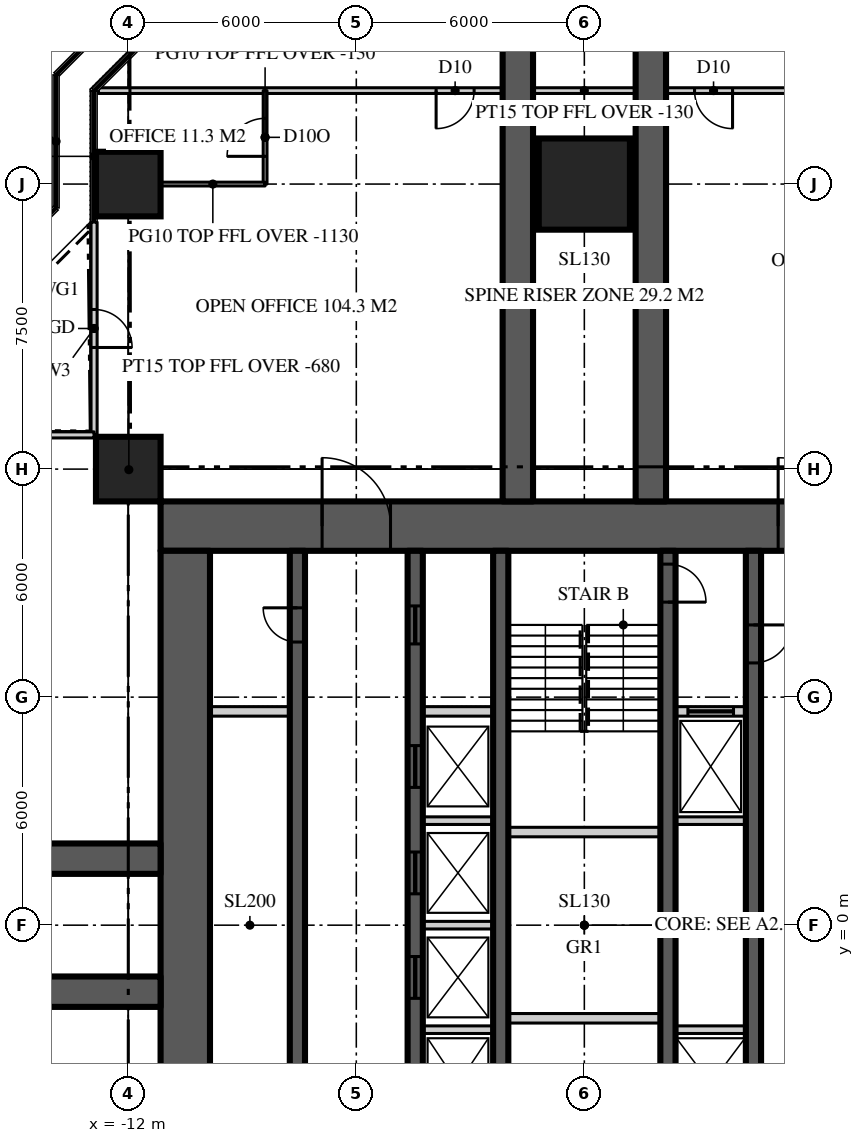
"""IFC4 building model, lengths in metres.
Left out: names, types, materials, properties, quantities, classifications, styles, units other than length and angle.
Written with IfcOpenShell. Run it as: python <this file> out.ifc"""

import sys

from ifc_helpers import new_model, si_unit, direction, frame, frame_2d, origin, origin_2d, place, context, subcontext, project, spatial, rectangle, extrude, element, fill, save


model = new_model("IFC4")
c1 = context("Model", 3, precision=1e-05, world=origin(), true_north=direction((0.0, 1.0)))
c2 = subcontext(c1, "Body", "Model", "MODEL_VIEW")
j1 = project(units=[si_unit("LENGTHUNIT", "METRE"), si_unit("PLANEANGLEUNIT", "RADIAN")], contexts=[c1])
p1 = place(None, origin())
s1 = spatial("IfcSite", under=j1, at=p1, CompositionType="ELEMENT")
p2 = place(p1, origin())
s2 = spatial("IfcBuilding", under=s1, at=p2, CompositionType="ELEMENT")
p3 = place(p2, frame((0.0, 0.0, 186.6)))
s3 = spatial("IfcBuildingStorey", under=s2, at=p3, CompositionType="ELEMENT", Elevation=186.6)
p4 = place(p3, frame((-11.15, 10.5, 0.0), z_axis=(0.0, 0.0, 1.0), x_axis=(1.0, 0.0, 0.0)))
e1 = element("IfcWall", 1, at=p4, inside=s3, PredefinedType="SHEAR", context=c2, shape_type="SweptSolid", body=[
    extrude(rectangle(XDim=22.3, YDim=1.3, at=frame_2d((11.15, 0.0))), origin(), (0.0, 0.0, 1.0), 3.9),
])
p5 = place(p4, frame((4.25, 0.0, 0.0)))
e2 = element("IfcOpeningElement", 2, at=p5, cuts=e1, PredefinedType="OPENING", context=c2, shape_type="SweptSolid", body=[
    extrude(rectangle(XDim=1.8, YDim=2.2, at=frame_2d((0.9, 1.1))), frame((0.0, 0.66, 0.0), z_axis=(0.0, -1.0, 0.0), x_axis=(1.0, 0.0, 0.0)), (0.0, 0.0, 1.0), 1.32),
])
p6 = place(p4, frame((16.25, 0.0, 0.0)))
e3 = element("IfcOpeningElement", 3, at=p6, cuts=e1, PredefinedType="OPENING", context=c2, shape_type="SweptSolid", body=[
    extrude(rectangle(XDim=1.8, YDim=2.2, at=frame_2d((0.9, 1.1))), frame((0.0, 0.66, 0.0), z_axis=(0.0, -1.0, 0.0), x_axis=(1.0, 0.0, 0.0)), (0.0, 0.0, 1.0), 1.32),
])
p7 = place(p3, frame((-10.5, 9.85, 0.0), z_axis=(0.0, 0.0, 1.0), x_axis=(0.0, -1.0, 0.0)))
e4 = element("IfcWall", 4, at=p7, inside=s3, PredefinedType="SHEAR", context=c2, shape_type="SweptSolid", body=[
    extrude(rectangle(XDim=19.7, YDim=1.3, at=frame_2d((9.85, 0.0))), origin(), (0.0, 0.0, 1.0), 3.9),
])
p8 = place(p7, frame((17.25, 0.0, 0.0)))
e5 = element("IfcOpeningElement", 5, at=p8, cuts=e4, PredefinedType="OPENING", context=c2, shape_type="SweptSolid", body=[
    extrude(rectangle(XDim=1.0, YDim=2.2, at=frame_2d((0.5, 1.1))), frame((0.0, 0.66, 0.0), z_axis=(0.0, -1.0, 0.0), x_axis=(1.0, 0.0, 0.0)), (0.0, 0.0, 1.0), 1.32),
])
for number, where, z_axis, x_axis in (
    (6, (1.75, 11.15, 0.0), (0.0, 0.0, 1.0), (0.0, 1.0, 0.0)),
    (7, (-1.75, 11.15, 0.0), (0.0, 0.0, 1.0), (0.0, 1.0, 0.0)),
    (8, (-11.15, 1.75, 0.0), (0.0, 0.0, 1.0), (-1.0, 0.0, 0.0)),
    (9, (-11.15, -1.75, 0.0), (0.0, 0.0, 1.0), (-1.0, 0.0, 0.0)),
):
    element("IfcWall", number, at=place(p3, frame(where, z_axis=z_axis, x_axis=x_axis)), inside=s3, PredefinedType="SHEAR", context=c2, shape_type="SweptSolid", body=[
        extrude(rectangle(XDim=15.25, YDim=0.8, at=frame_2d((7.625, 0.0))), origin(), (0.0, 0.0, 1.0), 3.9),
    ])
for number, where, z_axis, x_axis in (
    (10, (-12.0, 12.0, 0.0), (0.0, 0.0, 1.0), (1.0, 0.0, 0.0)),
    (11, (-12.0, 19.5, 0.0), (0.0, 0.0, 1.0), (1.0, 0.0, 0.0)),
):
    element("IfcColumn", number, at=place(p3, frame(where, z_axis=z_axis, x_axis=x_axis)), inside=s3, PredefinedType="COLUMN", context=c2, shape_type="SweptSolid", body=[
        extrude(rectangle(XDim=1.7, YDim=1.7, at=origin_2d()), origin(), (0.0, 0.0, 1.0), 3.9),
    ])
p9 = place(p3, frame((0.0, 19.5, 0.0), z_axis=(0.0, 0.0, 1.0), x_axis=(1.0, 0.0, 0.0)))
e12 = element("IfcColumn", 12, at=p9, inside=s3, PredefinedType="COLUMN", context=c2, shape_type="SweptSolid", body=[
    extrude(rectangle(XDim=2.4, YDim=2.4, at=origin_2d()), origin(), (0.0, 0.0, 1.0), 3.9),
])
p10 = place(p3, frame((-12.9, 18.5, 0.0), z_axis=(0.0, 0.0, 1.0), x_axis=(0.0, -1.0, 0.0)))
e13 = element("IfcWall", 13, at=p10, inside=s3, PredefinedType="SOLIDWALL", context=c2, shape_type="SweptSolid", body=[
    extrude(rectangle(XDim=5.6, YDim=0.16, at=frame_2d((2.8, 0.0))), origin(), (0.0, 0.0, 1.0), 3.77),
])
p11 = place(p10, frame((2.3, 0.0, 0.0)))
e14 = element("IfcOpeningElement", 14, at=p11, cuts=e13, PredefinedType="OPENING", context=c2, shape_type="SweptSolid", body=[
    extrude(rectangle(XDim=1.0, YDim=2.2, at=frame_2d((0.5, 1.1))), frame((0.0, 0.09, 0.0), z_axis=(0.0, -1.0, 0.0), x_axis=(1.0, 0.0, 0.0)), (0.0, 0.0, 1.0), 0.18),
])
p12 = place(p3, frame((-12.9, 12.9, 0.0), z_axis=(0.0, 0.0, 1.0), x_axis=(-1.0, 0.0, 0.0)))
e15 = element("IfcWall", 15, at=p12, inside=s3, PredefinedType="SOLIDWALL", context=c2, shape_type="SweptSolid", body=[
    extrude(rectangle(XDim=5.6, YDim=0.16, at=frame_2d((2.8, 0.0))), origin(), (0.0, 0.0, 1.0), 3.77),
])
p13 = place(p3, frame((-7.55, -9.85, 0.0), z_axis=(0.0, 0.0, 1.0), x_axis=(0.0, 1.0, 0.0)))
e16 = element("IfcWall", 16, at=p13, inside=s3, PredefinedType="SHEAR", context=c2, shape_type="SweptSolid", body=[
    extrude(rectangle(XDim=19.7, YDim=0.4, at=frame_2d((9.85, 0.0))), origin(), (0.0, 0.0, 1.0), 3.9),
])
p14 = place(p13, frame((1.45, 0.0, 0.0)))
e17 = element("IfcOpeningElement", 17, at=p14, cuts=e16, PredefinedType="OPENING", context=c2, shape_type="SweptSolid", body=[
    extrude(rectangle(XDim=1.0, YDim=2.2, at=frame_2d((0.5, 1.1))), frame((0.0, 0.21, 0.0), z_axis=(0.0, -1.0, 0.0), x_axis=(1.0, 0.0, 0.0)), (0.0, 0.0, 1.0), 0.42),
])
p15 = place(p13, frame((17.3, 0.0, 0.0)))
e18 = element("IfcOpeningElement", 18, at=p15, cuts=e16, PredefinedType="OPENING", context=c2, shape_type="SweptSolid", body=[
    extrude(rectangle(XDim=0.9, YDim=2.1, at=frame_2d((0.45, 1.05))), frame((0.0, 0.21, 0.0), z_axis=(0.0, -1.0, 0.0), x_axis=(1.0, 0.0, 0.0)), (0.0, 0.0, 1.0), 0.42),
])
p16 = place(p3, frame((-4.45, -9.85, 0.0), z_axis=(0.0, 0.0, 1.0), x_axis=(0.0, 1.0, 0.0)))
e19 = element("IfcWall", 19, at=p16, inside=s3, PredefinedType="SHEAR", context=c2, shape_type="SweptSolid", body=[
    extrude(rectangle(XDim=19.7, YDim=0.4, at=frame_2d((9.85, 0.0))), origin(), (0.0, 0.0, 1.0), 3.9),
])
p17 = place(p16, frame((1.95, 0.0, 0.0)))
e20 = element("IfcOpeningElement", 20, at=p17, cuts=e19, PredefinedType="OPENING", context=c2, shape_type="SweptSolid", body=[
    extrude(rectangle(XDim=1.0, YDim=2.2, at=frame_2d((0.5, 1.1))), frame((0.0, 0.21, 0.0), z_axis=(0.0, -1.0, 0.0), x_axis=(1.0, 0.0, 0.0)), (0.0, 0.0, 1.0), 0.42),
])
p18 = place(p16, frame((17.25, 0.0, 0.0)))
e21 = element("IfcOpeningElement", 21, at=p18, cuts=e19, PredefinedType="OPENING", context=c2, shape_type="SweptSolid", body=[
    extrude(rectangle(XDim=1.0, YDim=2.1, at=frame_2d((0.5, 1.05))), frame((0.0, 0.21, 0.0), z_axis=(0.0, -1.0, 0.0), x_axis=(1.0, 0.0, 0.0)), (0.0, 0.0, 1.0), 0.42),
])
p19 = place(p16, frame((7.925, 0.0, 0.0)))
e22 = element("IfcOpeningElement", 22, at=p19, cuts=e19, PredefinedType="OPENING", context=c2, shape_type="SweptSolid", body=[
    extrude(rectangle(XDim=1.1, YDim=2.2, at=frame_2d((0.55, 1.1))), frame((0.0, 0.21, 0.0), z_axis=(0.0, -1.0, 0.0), x_axis=(1.0, 0.0, 0.0)), (0.0, 0.0, 1.0), 0.42),
])
p20 = place(p16, frame((10.675, 0.0, 0.0)))
e23 = element("IfcOpeningElement", 23, at=p20, cuts=e19, PredefinedType="OPENING", context=c2, shape_type="SweptSolid", body=[
    extrude(rectangle(XDim=1.1, YDim=2.2, at=frame_2d((0.55, 1.1))), frame((0.0, 0.21, 0.0), z_axis=(0.0, -1.0, 0.0), x_axis=(1.0, 0.0, 0.0)), (0.0, 0.0, 1.0), 0.42),
])
p21 = place(p16, frame((13.475, 0.0, 0.0)))
e24 = element("IfcOpeningElement", 24, at=p21, cuts=e19, PredefinedType="OPENING", context=c2, shape_type="SweptSolid", body=[
    extrude(rectangle(XDim=1.1, YDim=2.2, at=frame_2d((0.55, 1.1))), frame((0.0, 0.21, 0.0), z_axis=(0.0, -1.0, 0.0), x_axis=(1.0, 0.0, 0.0)), (0.0, 0.0, 1.0), 0.42),
])
p22 = place(p3, frame((4.45, 9.85, 0.0), z_axis=(0.0, 0.0, 1.0), x_axis=(0.0, -1.0, 0.0)))
e25 = element("IfcWall", 25, at=p22, inside=s3, PredefinedType="SHEAR", context=c2, shape_type="SweptSolid", body=[
    extrude(rectangle(XDim=19.7, YDim=0.4, at=frame_2d((9.85, 0.0))), origin(), (0.0, 0.0, 1.0), 3.9),
])
p23 = place(p22, frame((1.95, 0.0, 0.0)))
e26 = element("IfcOpeningElement", 26, at=p23, cuts=e25, PredefinedType="OPENING", context=c2, shape_type="SweptSolid", body=[
    extrude(rectangle(XDim=1.0, YDim=2.2, at=frame_2d((0.5, 1.1))), frame((0.0, 0.21, 0.0), z_axis=(0.0, -1.0, 0.0), x_axis=(1.0, 0.0, 0.0)), (0.0, 0.0, 1.0), 0.42),
])
p24 = place(p22, frame((17.3, 0.0, 0.0)))
e27 = element("IfcOpeningElement", 27, at=p24, cuts=e25, PredefinedType="OPENING", context=c2, shape_type="SweptSolid", body=[
    extrude(rectangle(XDim=0.9, YDim=2.1, at=frame_2d((0.45, 1.05))), frame((0.0, 0.21, 0.0), z_axis=(0.0, -1.0, 0.0), x_axis=(1.0, 0.0, 0.0)), (0.0, 0.0, 1.0), 0.42),
])
p25 = place(p3, frame((-2.2, -9.85, 0.0), z_axis=(0.0, 0.0, 1.0), x_axis=(0.0, 1.0, 0.0)))
e28 = element("IfcWall", 28, at=p25, inside=s3, PredefinedType="SHEAR", context=c2, shape_type="SweptSolid", body=[
    extrude(rectangle(XDim=19.7, YDim=0.4, at=frame_2d((9.85, 0.0))), origin(), (0.0, 0.0, 1.0), 3.9),
])
p26 = place(p25, frame((0.35, 0.0, 0.0)))
e29 = element("IfcOpeningElement", 29, at=p26, cuts=e28, PredefinedType="OPENING", context=c2, shape_type="SweptSolid", body=[
    extrude(rectangle(XDim=1.0, YDim=2.2, at=frame_2d((0.5, 1.1))), frame((0.0, 0.21, 0.0), z_axis=(0.0, -1.0, 0.0), x_axis=(1.0, 0.0, 0.0)), (0.0, 0.0, 1.0), 0.42),
])
p27 = place(p3, frame((2.2, 9.85, 0.0), z_axis=(0.0, 0.0, 1.0), x_axis=(0.0, -1.0, 0.0)))
e30 = element("IfcWall", 30, at=p27, inside=s3, PredefinedType="SHEAR", context=c2, shape_type="SweptSolid", body=[
    extrude(rectangle(XDim=19.7, YDim=0.4, at=frame_2d((9.85, 0.0))), origin(), (0.0, 0.0, 1.0), 3.9),
])
p28 = place(p27, frame((0.35, 0.0, 0.0)))
e31 = element("IfcOpeningElement", 31, at=p28, cuts=e30, PredefinedType="OPENING", context=c2, shape_type="SweptSolid", body=[
    extrude(rectangle(XDim=1.0, YDim=2.2, at=frame_2d((0.5, 1.1))), frame((0.0, 0.21, 0.0), z_axis=(0.0, -1.0, 0.0), x_axis=(1.0, 0.0, 0.0)), (0.0, 0.0, 1.0), 0.42),
])
p29 = place(p3, frame((-9.85, 5.625, 0.0), z_axis=(0.0, 0.0, 1.0), x_axis=(1.0, 0.0, 0.0)))
e32 = element("IfcWall", 32, at=p29, inside=s3, PredefinedType="SOLIDWALL", context=c2, shape_type="SweptSolid", body=[
    extrude(rectangle(XDim=2.1, YDim=0.25, at=frame_2d((1.05, 0.0))), origin(), (0.0, 0.0, 1.0), 3.7),
])
p30 = place(p3, frame((-4.25, 5.625, 0.0), z_axis=(0.0, 0.0, 1.0), x_axis=(1.0, 0.0, 0.0)))
e33 = element("IfcWall", 33, at=p30, inside=s3, PredefinedType="SOLIDWALL", context=c2, shape_type="SweptSolid", body=[
    extrude(rectangle(XDim=1.85, YDim=0.25, at=frame_2d((0.925, 0.0))), origin(), (0.0, 0.0, 1.0), 3.7),
])
p31 = place(p3, frame((2.4, 5.625, 0.0), z_axis=(0.0, 0.0, 1.0), x_axis=(1.0, 0.0, 0.0)))
e34 = element("IfcWall", 34, at=p31, inside=s3, PredefinedType="SOLIDWALL", context=c2, shape_type="SweptSolid", body=[
    extrude(rectangle(XDim=1.85, YDim=0.25, at=frame_2d((0.925, 0.0))), origin(), (0.0, 0.0, 1.0), 3.7),
])
p32 = place(p31, frame((0.325, 0.0, 0.0)))
e35 = element("IfcOpeningElement", 35, at=p32, cuts=e34, PredefinedType="OPENING", context=c2, shape_type="SweptSolid", body=[
    extrude(rectangle(XDim=1.2, YDim=2.2, at=frame_2d((0.6, 1.1))), frame((0.0, 0.135, 0.0), z_axis=(0.0, -1.0, 0.0), x_axis=(1.0, 0.0, 0.0)), (0.0, 0.0, 1.0), 0.27),
])
for number, where, z_axis, x_axis in (
    (36, (-2.0, -2.45, 0.0), (0.0, 0.0, 1.0), (1.0, 0.0, 0.0)),
    (37, (-2.0, 2.45, 0.0), (0.0, 0.0, 1.0), (1.0, 0.0, 0.0)),
):
    element("IfcWall", number, at=place(p3, frame(where, z_axis=z_axis, x_axis=x_axis)), inside=s3, PredefinedType="SOLIDWALL", context=c2, shape_type="SweptSolid", body=[
        extrude(rectangle(XDim=4.0, YDim=0.25, at=frame_2d((2.0, 0.0))), origin(), (0.0, 0.0, 1.0), 3.7),
    ])
for number, where, z_axis, x_axis in (
    (38, (-4.25, -2.75, 0.0), (0.0, 0.0, 1.0), (1.0, 0.0, 0.0)),
    (39, (2.4, -2.75, 0.0), (0.0, 0.0, 1.0), (1.0, 0.0, 0.0)),
    (40, (-4.25, 0.0, 0.0), (0.0, 0.0, 1.0), (1.0, 0.0, 0.0)),
    (41, (-4.25, 2.75, 0.0), (0.0, 0.0, 1.0), (1.0, 0.0, 0.0)),
    (42, (2.4, 2.75, 0.0), (0.0, 0.0, 1.0), (1.0, 0.0, 0.0)),
):
    element("IfcWall", number, at=place(p3, frame(where, z_axis=z_axis, x_axis=x_axis)), inside=s3, PredefinedType="SOLIDWALL", context=c2, shape_type="SweptSolid", body=[
        extrude(rectangle(XDim=1.85, YDim=0.2, at=frame_2d((0.925, 0.0))), origin(), (0.0, 0.0, 1.0), 3.7),
    ])
p33 = place(p3, frame((12.786, 21.959, 0.0), z_axis=(0.0, 0.0, 1.0), x_axis=(-1.0, 0.0, 0.0)))
e43 = element("IfcWall", 43, at=p33, inside=s3, PredefinedType="PARTITIONING", context=c2, shape_type="SweptSolid", body=[
    extrude(rectangle(XDim=25.573, YDim=0.15, at=frame_2d((12.786, 0.0))), origin(), (0.0, 0.0, 1.0), 3.77),
])
p34 = place(p33, frame((15.687, 0.0, 0.0)))
e44 = element("IfcOpeningElement", 44, at=p34, cuts=e43, PredefinedType="OPENING", context=c2, shape_type="SweptSolid", body=[
    extrude(rectangle(XDim=1.0, YDim=2.2, at=frame_2d((0.5, 1.1))), frame((0.0, 0.085, 0.0), z_axis=(0.0, -1.0, 0.0), x_axis=(1.0, 0.0, 0.0)), (0.0, 0.0, 1.0), 0.17),
])
p35 = place(p33, frame((8.886, 0.0, 0.0)))
e45 = element("IfcOpeningElement", 45, at=p35, cuts=e43, PredefinedType="OPENING", context=c2, shape_type="SweptSolid", body=[
    extrude(rectangle(XDim=1.0, YDim=2.2, at=frame_2d((0.5, 1.1))), frame((0.0, 0.085, 0.0), z_axis=(0.0, -1.0, 0.0), x_axis=(1.0, 0.0, 0.0)), (0.0, 0.0, 1.0), 0.17),
])
p36 = place(p3, frame((-8.4, 19.5, 0.0), z_axis=(0.0, 0.0, 1.0), x_axis=(0.0, 1.0, 0.0)))
e46 = element("IfcWall", 46, at=p36, inside=s3, PredefinedType="PARTITIONING", context=c2, shape_type="SweptSolid", body=[
    extrude(rectangle(XDim=2.459, YDim=0.1, at=frame_2d((1.229, 0.0))), origin(), (0.0, 0.0, 1.0), 3.77),
])
p37 = place(p36, frame((0.729, 0.0, 0.0)))
e47 = element("IfcOpeningElement", 47, at=p37, cuts=e46, PredefinedType="OPENING", context=c2, shape_type="SweptSolid", body=[
    extrude(rectangle(XDim=1.0, YDim=2.2, at=frame_2d((0.5, 1.1))), frame((0.0, 0.06, 0.0), z_axis=(0.0, -1.0, 0.0), x_axis=(1.0, 0.0, 0.0)), (0.0, 0.0, 1.0), 0.12),
])
p38 = place(p3, frame((-8.4, 19.5, 0.0), z_axis=(0.0, 0.0, 1.0), x_axis=(-1.0, 0.0, 0.0)))
e48 = element("IfcWall", 48, at=p38, inside=s3, PredefinedType="PARTITIONING", context=c2, shape_type="SweptSolid", body=[
    extrude(rectangle(XDim=2.75, YDim=0.1, at=frame_2d((1.375, 0.0))), origin(), (0.0, 0.0, 1.0), 2.77),
])
p39 = place(p3, frame((-11.15, 11.15, 0.0), z_axis=(0.0, 0.0, 1.0), x_axis=(-0.707106781187, 0.707106781187, 0.0)))
e49 = element("IfcWall", 49, at=p39, inside=s3, PredefinedType="PARTITIONING", context=c2, shape_type="SweptSolid", body=[
    extrude(rectangle(XDim=2.362, YDim=0.15, at=frame_2d((1.181, 0.0))), origin(), (0.0, 0.0, 1.0), 3.22),
])
p40 = place(p11, origin())
e50 = element("IfcDoor", 50, at=p40, inside=s3, OperationType="SINGLE_SWING_RIGHT", PredefinedType="DOOR", context=c2, shape_type="SweptSolid", body=[
    extrude(rectangle(XDim=1.0, YDim=2.2, at=frame_2d((0.5, 1.1))), frame((0.0, 0.025, 0.0), z_axis=(0.0, -1.0, 0.0), x_axis=(1.0, 0.0, 0.0)), (0.0, 0.0, 1.0), 0.05),
])
fill(e14, e50)
p41 = place(p5, origin())
e51 = element("IfcDoor", 51, at=p41, inside=s3, OperationType="DOUBLE_DOOR_DOUBLE_SWING", PredefinedType="DOOR", context=c2, shape_type="SweptSolid", body=[
    extrude(rectangle(XDim=1.8, YDim=2.2, at=frame_2d((0.9, 1.1))), frame((0.0, 0.025, 0.0), z_axis=(0.0, -1.0, 0.0), x_axis=(1.0, 0.0, 0.0)), (0.0, 0.0, 1.0), 0.05),
])
fill(e2, e51)
p42 = place(p6, origin())
e52 = element("IfcDoor", 52, at=p42, inside=s3, OperationType="DOUBLE_DOOR_DOUBLE_SWING", PredefinedType="DOOR", context=c2, shape_type="SweptSolid", body=[
    extrude(rectangle(XDim=1.8, YDim=2.2, at=frame_2d((0.9, 1.1))), frame((0.0, 0.025, 0.0), z_axis=(0.0, -1.0, 0.0), x_axis=(1.0, 0.0, 0.0)), (0.0, 0.0, 1.0), 0.05),
])
fill(e3, e52)
p43 = place(p23, origin())
e53 = element("IfcDoor", 53, at=p43, inside=s3, OperationType="SINGLE_SWING_LEFT", PredefinedType="DOOR", context=c2, shape_type="SweptSolid", body=[
    extrude(rectangle(XDim=1.0, YDim=2.2, at=frame_2d((0.5, 1.1))), frame((0.0, 0.025, 0.0), z_axis=(0.0, -1.0, 0.0), x_axis=(1.0, 0.0, 0.0)), (0.0, 0.0, 1.0), 0.05),
])
fill(e26, e53)
p44 = place(p28, origin())
e54 = element("IfcDoor", 54, at=p44, inside=s3, OperationType="SINGLE_SWING_RIGHT", PredefinedType="DOOR", context=c2, shape_type="SweptSolid", body=[
    extrude(rectangle(XDim=1.0, YDim=2.2, at=frame_2d((0.5, 1.1))), frame((0.0, 0.025, 0.0), z_axis=(0.0, -1.0, 0.0), x_axis=(1.0, 0.0, 0.0)), (0.0, 0.0, 1.0), 0.05),
])
fill(e31, e54)
p45 = place(p15, origin())
e55 = element("IfcDoor", 55, at=p45, inside=s3, OperationType="SINGLE_SWING_RIGHT", PredefinedType="DOOR", context=c2, shape_type="SweptSolid", body=[
    extrude(rectangle(XDim=0.9, YDim=2.1, at=frame_2d((0.45, 1.05))), frame((0.0, 0.025, 0.0), z_axis=(0.0, -1.0, 0.0), x_axis=(1.0, 0.0, 0.0)), (0.0, 0.0, 1.0), 0.05),
])
fill(e18, e55)
p46 = place(p18, origin())
e56 = element("IfcDoor", 56, at=p46, inside=s3, OperationType="SLIDING_TO_LEFT", PredefinedType="DOOR", context=c2, shape_type="SweptSolid", body=[
    extrude(rectangle(XDim=1.0, YDim=2.1, at=frame_2d((0.5, 1.05))), frame((0.0, 0.025, 0.0), z_axis=(0.0, -1.0, 0.0), x_axis=(1.0, 0.0, 0.0)), (0.0, 0.0, 1.0), 0.05),
])
fill(e21, e56)
p47 = place(p19, origin())
e57 = element("IfcDoor", 57, at=p47, inside=s3, OperationType="SLIDING_TO_LEFT", PredefinedType="DOOR", context=c2, shape_type="SweptSolid", body=[
    extrude(rectangle(XDim=1.1, YDim=2.2, at=frame_2d((0.55, 1.1))), frame((0.0, 0.025, 0.0), z_axis=(0.0, -1.0, 0.0), x_axis=(1.0, 0.0, 0.0)), (0.0, 0.0, 1.0), 0.05),
])
fill(e22, e57)
p48 = place(p20, origin())
e58 = element("IfcDoor", 58, at=p48, inside=s3, OperationType="SLIDING_TO_LEFT", PredefinedType="DOOR", context=c2, shape_type="SweptSolid", body=[
    extrude(rectangle(XDim=1.1, YDim=2.2, at=frame_2d((0.55, 1.1))), frame((0.0, 0.025, 0.0), z_axis=(0.0, -1.0, 0.0), x_axis=(1.0, 0.0, 0.0)), (0.0, 0.0, 1.0), 0.05),
])
fill(e23, e58)
p49 = place(p21, origin())
e59 = element("IfcDoor", 59, at=p49, inside=s3, OperationType="SLIDING_TO_LEFT", PredefinedType="DOOR", context=c2, shape_type="SweptSolid", body=[
    extrude(rectangle(XDim=1.1, YDim=2.2, at=frame_2d((0.55, 1.1))), frame((0.0, 0.025, 0.0), z_axis=(0.0, -1.0, 0.0), x_axis=(1.0, 0.0, 0.0)), (0.0, 0.0, 1.0), 0.05),
])
fill(e24, e59)
p50 = place(p32, origin())
e60 = element("IfcDoor", 60, at=p50, inside=s3, OperationType="SLIDING_TO_LEFT", PredefinedType="DOOR", context=c2, shape_type="SweptSolid", body=[
    extrude(rectangle(XDim=1.2, YDim=2.2, at=frame_2d((0.6, 1.1))), frame((0.0, 0.025, 0.0), z_axis=(0.0, -1.0, 0.0), x_axis=(1.0, 0.0, 0.0)), (0.0, 0.0, 1.0), 0.05),
])
fill(e35, e60)
p51 = place(p34, origin())
e61 = element("IfcDoor", 61, at=p51, inside=s3, OperationType="SINGLE_SWING_RIGHT", PredefinedType="DOOR", context=c2, shape_type="SweptSolid", body=[
    extrude(rectangle(XDim=1.0, YDim=2.2, at=frame_2d((0.5, 1.1))), frame((0.0, 0.025, 0.0), z_axis=(0.0, -1.0, 0.0), x_axis=(1.0, 0.0, 0.0)), (0.0, 0.0, 1.0), 0.05),
])
fill(e44, e61)
p52 = place(p35, origin())
e62 = element("IfcDoor", 62, at=p52, inside=s3, OperationType="SINGLE_SWING_LEFT", PredefinedType="DOOR", context=c2, shape_type="SweptSolid", body=[
    extrude(rectangle(XDim=1.0, YDim=2.2, at=frame_2d((0.5, 1.1))), frame((0.0, 0.025, 0.0), z_axis=(0.0, -1.0, 0.0), x_axis=(1.0, 0.0, 0.0)), (0.0, 0.0, 1.0), 0.05),
])
fill(e45, e62)
p53 = place(p37, origin())
e63 = element("IfcDoor", 63, at=p53, inside=s3, OperationType="SINGLE_SWING_LEFT", PredefinedType="DOOR", context=c2, shape_type="SweptSolid", body=[
    extrude(rectangle(XDim=1.0, YDim=2.2, at=frame_2d((0.5, 1.1))), frame((0.0, 0.025, 0.0), z_axis=(0.0, -1.0, 0.0), x_axis=(1.0, 0.0, 0.0)), (0.0, 0.0, 1.0), 0.05),
])
fill(e47, e63)
save(model, sys.argv[1])
